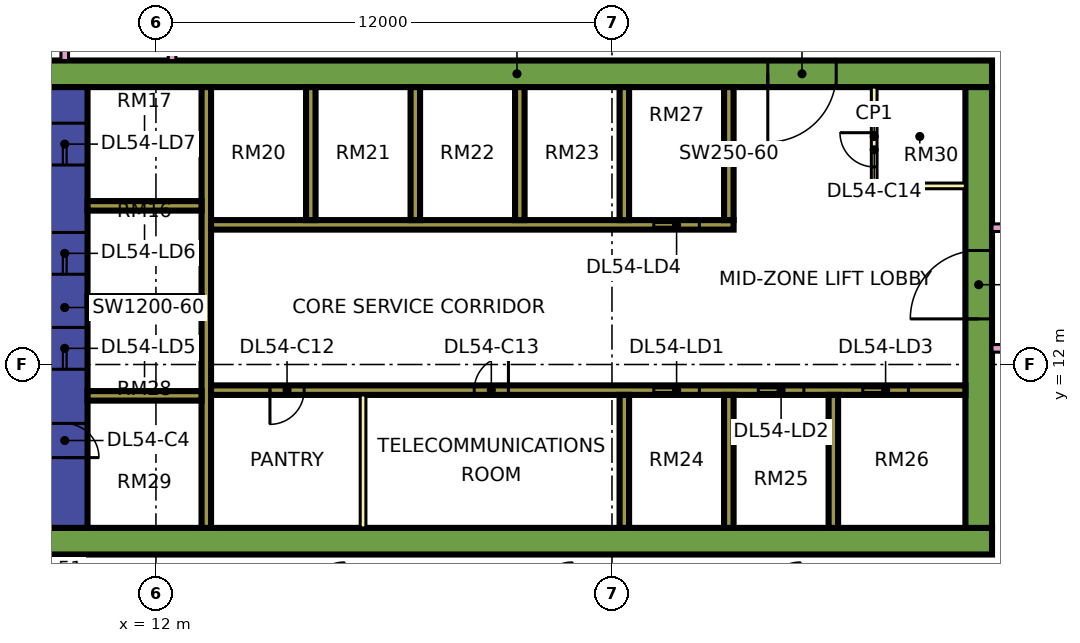
"""IFC4 building model, lengths in metres.
Left out: names, types, materials, properties, quantities, classifications, styles, units other than length and angle.
Written with IfcOpenShell. Run it as: python <this file> out.ifc"""

import sys

from ifc_helpers import new_model, si_unit, direction, frame, frame_2d, origin, place, context, subcontext, project, spatial, rectangle, extrude, element, fill, save


model = new_model("IFC4")
c1 = context("Model", 3, precision=1e-05, world=origin(), true_north=direction((0.0, 1.0)))
c2 = subcontext(c1, "Body", "Model", "MODEL_VIEW")
j1 = project(units=[si_unit("LENGTHUNIT", "METRE"), si_unit("PLANEANGLEUNIT", "RADIAN")], contexts=[c1])
p1 = place(None, origin())
s1 = spatial("IfcSite", under=j1, at=p1, CompositionType="ELEMENT")
p2 = place(p1, origin())
s2 = spatial("IfcBuilding", under=s1, at=p2, CompositionType="ELEMENT")
p3 = place(p2, frame((0.0, 0.0, 230.4)))
s3 = spatial("IfcBuildingStorey", under=s2, at=p3, CompositionType="ELEMENT", Elevation=230.4)
p4 = place(p3, frame((9.0, 7.35, 0.0), z_axis=(0.0, 0.0, 1.0), x_axis=(1.0, 0.0, 0.0)))
e1 = element("IfcWall", 1, at=p4, inside=s3, PredefinedType="SHEAR", context=c2, shape_type="SweptSolid", body=[
    extrude(rectangle(XDim=25.0, YDim=0.7, at=frame_2d((12.5, 0.0))), origin(), (0.0, 0.0, 1.0), 3.75),
])
p5 = place(p3, frame((9.0, 19.65, 0.0), z_axis=(0.0, 0.0, 1.0), x_axis=(1.0, 0.0, 0.0)))
e2 = element("IfcWall", 2, at=p5, inside=s3, PredefinedType="SHEAR", context=c2, shape_type="SweptSolid", body=[
    extrude(rectangle(XDim=25.0, YDim=0.7, at=frame_2d((12.5, 0.0))), origin(), (0.0, 0.0, 1.0), 3.75),
])
p6 = place(p5, frame((19.1, 0.0, 0.0)))
e3 = element("IfcOpeningElement", 3, at=p6, cuts=e2, PredefinedType="OPENING", context=c2, shape_type="SweptSolid", body=[
    extrude(rectangle(XDim=1.8, YDim=2.4, at=frame_2d((0.9, 1.2))), frame((0.0, 0.36, 0.0), z_axis=(0.0, -1.0, 0.0), x_axis=(1.0, 0.0, 0.0)), (0.0, 0.0, 1.0), 0.72),
])
p7 = place(p3, frame((9.6, 7.7, 0.0), z_axis=(0.0, 0.0, 1.0), x_axis=(0.0, 1.0, 0.0)))
e4 = element("IfcWall", 4, at=p7, inside=s3, PredefinedType="SHEAR", context=c2, shape_type="SweptSolid", body=[
    extrude(rectangle(XDim=11.6, YDim=1.2, at=frame_2d((5.8, 0.0))), origin(), (0.0, 0.0, 1.0), 3.75),
])
p8 = place(p7, frame((4.175, 0.0, 0.0)))
e5 = element("IfcOpeningElement", 5, at=p8, cuts=e4, PredefinedType="OPENING", context=c2, shape_type="SweptSolid", body=[
    extrude(rectangle(XDim=1.1, YDim=2.2, at=frame_2d((0.55, 1.1))), frame((0.0, 0.61, 0.0), z_axis=(0.0, -1.0, 0.0), x_axis=(1.0, 0.0, 0.0)), (0.0, 0.0, 1.0), 1.22),
])
p9 = place(p7, frame((6.675, 0.0, 0.0)))
e6 = element("IfcOpeningElement", 6, at=p9, cuts=e4, PredefinedType="OPENING", context=c2, shape_type="SweptSolid", body=[
    extrude(rectangle(XDim=1.1, YDim=2.2, at=frame_2d((0.55, 1.1))), frame((0.0, 0.61, 0.0), z_axis=(0.0, -1.0, 0.0), x_axis=(1.0, 0.0, 0.0)), (0.0, 0.0, 1.0), 1.22),
])
p10 = place(p7, frame((9.55, 0.0, 0.0)))
e7 = element("IfcOpeningElement", 7, at=p10, cuts=e4, PredefinedType="OPENING", context=c2, shape_type="SweptSolid", body=[
    extrude(rectangle(XDim=1.1, YDim=2.2, at=frame_2d((0.55, 1.1))), frame((0.0, 0.61, 0.0), z_axis=(0.0, -1.0, 0.0), x_axis=(1.0, 0.0, 0.0)), (0.0, 0.0, 1.0), 1.22),
])
p11 = place(p7, frame((1.85, 0.0, 0.0)))
e8 = element("IfcOpeningElement", 8, at=p11, cuts=e4, PredefinedType="OPENING", context=c2, shape_type="SweptSolid", body=[
    extrude(rectangle(XDim=0.9, YDim=2.1, at=frame_2d((0.45, 1.05))), frame((0.0, 0.61, 0.0), z_axis=(0.0, -1.0, 0.0), x_axis=(1.0, 0.0, 0.0)), (0.0, 0.0, 1.0), 1.22),
])
p12 = place(p3, frame((33.65, 7.7, 0.0), z_axis=(0.0, 0.0, 1.0), x_axis=(0.0, 1.0, 0.0)))
e9 = element("IfcWall", 9, at=p12, inside=s3, PredefinedType="SHEAR", context=c2, shape_type="SweptSolid", body=[
    extrude(rectangle(XDim=11.6, YDim=0.7, at=frame_2d((5.8, 0.0))), origin(), (0.0, 0.0, 1.0), 3.75),
])
p13 = place(p12, frame((5.5, 0.0, 0.0)))
e10 = element("IfcOpeningElement", 10, at=p13, cuts=e9, PredefinedType="OPENING", context=c2, shape_type="SweptSolid", body=[
    extrude(rectangle(XDim=1.8, YDim=2.4, at=frame_2d((0.9, 1.2))), frame((0.0, 0.36, 0.0), z_axis=(0.0, -1.0, 0.0), x_axis=(1.0, 0.0, 0.0)), (0.0, 0.0, 1.0), 0.72),
])
p14 = place(p3, frame((13.325, 7.7, 0.0), z_axis=(0.0, 0.0, 1.0), x_axis=(0.0, 1.0, 0.0)))
e11 = element("IfcWall", 11, at=p14, inside=s3, PredefinedType="SHEAR", context=c2, shape_type="SweptSolid", body=[
    extrude(rectangle(XDim=11.6, YDim=0.25, at=frame_2d((5.8, 0.0))), origin(), (0.0, 0.0, 1.0), 3.75),
])
p15 = place(p3, frame((13.45, 11.325, 0.0), z_axis=(0.0, 0.0, 1.0), x_axis=(1.0, 0.0, 0.0)))
e12 = element("IfcWall", 12, at=p15, inside=s3, PredefinedType="SHEAR", context=c2, shape_type="SweptSolid", body=[
    extrude(rectangle(XDim=19.85, YDim=0.25, at=frame_2d((9.925, 0.0))), origin(), (0.0, 0.0, 1.0), 3.75),
])
p16 = place(p15, frame((11.65, 0.0, 0.0)))
e13 = element("IfcOpeningElement", 13, at=p16, cuts=e12, PredefinedType="OPENING", context=c2, shape_type="SweptSolid", body=[
    extrude(rectangle(XDim=1.2, YDim=2.2, at=frame_2d((0.6, 1.1))), frame((0.0, 0.135, 0.0), z_axis=(0.0, -1.0, 0.0), x_axis=(1.0, 0.0, 0.0)), (0.0, 0.0, 1.0), 0.27),
])
p17 = place(p15, frame((14.4, 0.0, 0.0)))
e14 = element("IfcOpeningElement", 14, at=p17, cuts=e12, PredefinedType="OPENING", context=c2, shape_type="SweptSolid", body=[
    extrude(rectangle(XDim=1.2, YDim=2.2, at=frame_2d((0.6, 1.1))), frame((0.0, 0.135, 0.0), z_axis=(0.0, -1.0, 0.0), x_axis=(1.0, 0.0, 0.0)), (0.0, 0.0, 1.0), 0.27),
])
p18 = place(p15, frame((17.15, 0.0, 0.0)))
e15 = element("IfcOpeningElement", 15, at=p18, cuts=e12, PredefinedType="OPENING", context=c2, shape_type="SweptSolid", body=[
    extrude(rectangle(XDim=1.2, YDim=2.2, at=frame_2d((0.6, 1.1))), frame((0.0, 0.135, 0.0), z_axis=(0.0, -1.0, 0.0), x_axis=(1.0, 0.0, 0.0)), (0.0, 0.0, 1.0), 0.27),
])
p19 = place(p15, frame((1.55, 0.0, 0.0)))
e16 = element("IfcOpeningElement", 16, at=p19, cuts=e12, PredefinedType="OPENING", context=c2, shape_type="SweptSolid", body=[
    extrude(rectangle(XDim=0.9, YDim=2.1, at=frame_2d((0.45, 1.05))), frame((0.0, 0.135, 0.0), z_axis=(0.0, -1.0, 0.0), x_axis=(1.0, 0.0, 0.0)), (0.0, 0.0, 1.0), 0.27),
])
p20 = place(p15, frame((6.925, 0.0, 0.0)))
e17 = element("IfcOpeningElement", 17, at=p20, cuts=e12, PredefinedType="OPENING", context=c2, shape_type="SweptSolid", body=[
    extrude(rectangle(XDim=0.9, YDim=2.1, at=frame_2d((0.45, 1.05))), frame((0.0, 0.135, 0.0), z_axis=(0.0, -1.0, 0.0), x_axis=(1.0, 0.0, 0.0)), (0.0, 0.0, 1.0), 0.27),
])
p21 = place(p3, frame((13.45, 15.675, 0.0), z_axis=(0.0, 0.0, 1.0), x_axis=(1.0, 0.0, 0.0)))
e18 = element("IfcWall", 18, at=p21, inside=s3, PredefinedType="SHEAR", context=c2, shape_type="SweptSolid", body=[
    extrude(rectangle(XDim=13.75, YDim=0.25, at=frame_2d((6.875, 0.0))), origin(), (0.0, 0.0, 1.0), 3.75),
])
p22 = place(p21, frame((11.65, 0.0, 0.0)))
e19 = element("IfcOpeningElement", 19, at=p22, cuts=e18, PredefinedType="OPENING", context=c2, shape_type="SweptSolid", body=[
    extrude(rectangle(XDim=1.2, YDim=2.2, at=frame_2d((0.6, 1.1))), frame((0.0, 0.135, 0.0), z_axis=(0.0, -1.0, 0.0), x_axis=(1.0, 0.0, 0.0)), (0.0, 0.0, 1.0), 0.27),
])
for number, where, z_axis, x_axis in (
    (20, (10.2, 11.175, 0.0), (0.0, 0.0, 1.0), (1.0, 0.0, 0.0)),
    (21, (10.2, 13.675, 0.0), (0.0, 0.0, 1.0), (1.0, 0.0, 0.0)),
    (22, (10.2, 16.175, 0.0), (0.0, 0.0, 1.0), (1.0, 0.0, 0.0)),
):
    element("IfcWall", number, at=place(p3, frame(where, z_axis=z_axis, x_axis=x_axis)), inside=s3, PredefinedType="SHEAR", context=c2, shape_type="SweptSolid", body=[
        extrude(rectangle(XDim=3.0, YDim=0.25, at=frame_2d((1.5, 0.0))), origin(), (0.0, 0.0, 1.0), 3.75),
    ])
for number, where, z_axis, x_axis in (
    (23, (24.325, 7.7, 0.0), (0.0, 0.0, 1.0), (0.0, 1.0, 0.0)),
    (24, (27.075, 7.7, 0.0), (0.0, 0.0, 1.0), (0.0, 1.0, 0.0)),
    (25, (29.825, 7.7, 0.0), (0.0, 0.0, 1.0), (0.0, 1.0, 0.0)),
    (26, (16.075, 15.8, 0.0), (0.0, 0.0, 1.0), (0.0, 1.0, 0.0)),
    (27, (18.825, 15.8, 0.0), (0.0, 0.0, 1.0), (0.0, 1.0, 0.0)),
    (28, (21.575, 15.8, 0.0), (0.0, 0.0, 1.0), (0.0, 1.0, 0.0)),
    (29, (24.325, 15.8, 0.0), (0.0, 0.0, 1.0), (0.0, 1.0, 0.0)),
    (30, (27.075, 15.8, 0.0), (0.0, 0.0, 1.0), (0.0, 1.0, 0.0)),
):
    element("IfcWall", number, at=place(p3, frame(where, z_axis=z_axis, x_axis=x_axis)), inside=s3, PredefinedType="SHEAR", context=c2, shape_type="SweptSolid", body=[
        extrude(rectangle(XDim=3.5, YDim=0.25, at=frame_2d((1.75, 0.0))), origin(), (0.0, 0.0, 1.0), 3.75),
    ])
p23 = place(p3, frame((-1.447, 12.553, 0.0), z_axis=(0.0, 0.0, 1.0), x_axis=(0.707106781187, -0.707106781187, 0.0)))
e31 = element("IfcWall", 31, at=p23, inside=s3, PredefinedType="SOLIDWALL", context=c2, shape_type="SweptSolid", body=[
    extrude(rectangle(XDim=19.799, YDim=0.15, at=frame_2d((9.899, 0.0))), origin(), (0.0, 0.0, 1.0), 3.35),
])
p24 = place(p23, frame((2.212, 0.0, 0.45)))
e32 = element("IfcOpeningElement", 32, at=p24, cuts=e31, PredefinedType="OPENING", context=c2, shape_type="SweptSolid", body=[
    extrude(rectangle(XDim=3.0, YDim=2.4, at=frame_2d((1.5, 1.2))), frame((0.0, 0.085, 0.0), z_axis=(0.0, -1.0, 0.0), x_axis=(1.0, 0.0, 0.0)), (0.0, 0.0, 1.0), 0.17),
])
p25 = place(p23, frame((10.216, 0.0, 0.45)))
e33 = element("IfcOpeningElement", 33, at=p25, cuts=e31, PredefinedType="OPENING", context=c2, shape_type="SweptSolid", body=[
    extrude(rectangle(XDim=3.0, YDim=2.4, at=frame_2d((1.5, 1.2))), frame((0.0, 0.085, 0.0), z_axis=(0.0, -1.0, 0.0), x_axis=(1.0, 0.0, 0.0)), (0.0, 0.0, 1.0), 0.17),
])
p26 = place(p3, frame((17.45, 7.7, 0.0), z_axis=(0.0, 0.0, 1.0), x_axis=(0.0, 1.0, 0.0)))
e34 = element("IfcWall", 34, at=p26, inside=s3, PredefinedType="PARTITIONING", context=c2, shape_type="SweptSolid", body=[
    extrude(rectangle(XDim=3.5, YDim=0.15, at=frame_2d((1.75, 0.0))), origin(), (0.0, 0.0, 1.0), 3.35),
])
p27 = place(p3, frame((30.9, 16.7, 0.0), z_axis=(0.0, 0.0, 1.0), x_axis=(0.0, 1.0, 0.0)))
e35 = element("IfcWall", 35, at=p27, inside=s3, PredefinedType="PARTITIONING", context=c2, shape_type="SweptSolid", body=[
    extrude(rectangle(XDim=2.6, YDim=0.15, at=frame_2d((1.3, 0.0))), origin(), (0.0, 0.0, 1.0), 3.35),
])
p28 = place(p27, frame((0.5, 0.0, 0.0)))
e36 = element("IfcOpeningElement", 36, at=p28, cuts=e35, PredefinedType="OPENING", context=c2, shape_type="SweptSolid", body=[
    extrude(rectangle(XDim=0.9, YDim=2.1, at=frame_2d((0.45, 1.05))), frame((0.0, 0.085, 0.0), z_axis=(0.0, -1.0, 0.0), x_axis=(1.0, 0.0, 0.0)), (0.0, 0.0, 1.0), 0.17),
])
p29 = place(p3, frame((30.9, 16.7, 0.0), z_axis=(0.0, 0.0, 1.0), x_axis=(1.0, 0.0, 0.0)))
e37 = element("IfcWall", 37, at=p29, inside=s3, PredefinedType="PARTITIONING", context=c2, shape_type="SweptSolid", body=[
    extrude(rectangle(XDim=2.4, YDim=0.15, at=frame_2d((1.2, 0.0))), origin(), (0.0, 0.0, 1.0), 3.35),
])
p30 = place(p3, frame((9.6, 20.0, 0.0), z_axis=(0.0, 0.0, 1.0), x_axis=(0.0, 1.0, 0.0)))
e38 = element("IfcWall", 38, at=p30, inside=s3, PredefinedType="PARTITIONING", context=c2, shape_type="SweptSolid", body=[
    extrude(rectangle(XDim=44.35, YDim=0.2, at=frame_2d((22.175, 0.0))), origin(), (0.0, 0.0, 1.0), 3.35),
])
p31 = place(p30, frame((17.1, 0.0, 0.0)))
e39 = element("IfcOpeningElement", 39, at=p31, cuts=e38, PredefinedType="OPENING", context=c2, shape_type="SweptSolid", body=[
    extrude(rectangle(XDim=1.0, YDim=2.1, at=frame_2d((0.5, 1.05))), frame((0.0, 0.11, 0.0), z_axis=(0.0, -1.0, 0.0), x_axis=(1.0, 0.0, 0.0)), (0.0, 0.0, 1.0), 0.22),
])
p32 = place(p30, frame((0.6, 0.0, 0.0)))
e40 = element("IfcOpeningElement", 40, at=p32, cuts=e38, PredefinedType="OPENING", context=c2, shape_type="SweptSolid", body=[
    extrude(rectangle(XDim=1.2, YDim=2.1, at=frame_2d((0.6, 1.05))), frame((0.0, 0.11, 0.0), z_axis=(0.0, -1.0, 0.0), x_axis=(1.0, 0.0, 0.0)), (0.0, 0.0, 1.0), 0.22),
])
p33 = place(p30, frame((3.9, 0.0, 0.0)))
e41 = element("IfcOpeningElement", 41, at=p33, cuts=e38, PredefinedType="OPENING", context=c2, shape_type="SweptSolid", body=[
    extrude(rectangle(XDim=1.0, YDim=2.1, at=frame_2d((0.5, 1.05))), frame((0.0, 0.11, 0.0), z_axis=(0.0, -1.0, 0.0), x_axis=(1.0, 0.0, 0.0)), (0.0, 0.0, 1.0), 0.22),
])
p34 = place(p3, frame((12.425, 20.0, 0.0), z_axis=(0.0, 0.0, 1.0), x_axis=(0.0, 1.0, 0.0)))
e42 = element("IfcWall", 42, at=p34, inside=s3, PredefinedType="PARTITIONING", context=c2, shape_type="SweptSolid", body=[
    extrude(rectangle(XDim=42.926, YDim=0.2, at=frame_2d((21.463, 0.0))), origin(), (0.0, 0.0, 1.0), 3.35),
])
p35 = place(p34, frame((6.7, 0.0, 0.0)))
e43 = element("IfcOpeningElement", 43, at=p35, cuts=e42, PredefinedType="OPENING", context=c2, shape_type="SweptSolid", body=[
    extrude(rectangle(XDim=1.6, YDim=2.1, at=frame_2d((0.8, 1.05))), frame((0.0, 0.11, 0.0), z_axis=(0.0, -1.0, 0.0), x_axis=(1.0, 0.0, 0.0)), (0.0, 0.0, 1.0), 0.22),
])
p36 = place(p34, frame((12.95, 0.0, 0.0)))
e44 = element("IfcOpeningElement", 44, at=p36, cuts=e42, PredefinedType="OPENING", context=c2, shape_type="SweptSolid", body=[
    extrude(rectangle(XDim=1.0, YDim=2.1, at=frame_2d((0.5, 1.05))), frame((0.0, 0.11, 0.0), z_axis=(0.0, -1.0, 0.0), x_axis=(1.0, 0.0, 0.0)), (0.0, 0.0, 1.0), 0.22),
])
p37 = place(p34, frame((23.2, 0.0, 0.0)))
e45 = element("IfcOpeningElement", 45, at=p37, cuts=e42, PredefinedType="OPENING", context=c2, shape_type="SweptSolid", body=[
    extrude(rectangle(XDim=1.0, YDim=2.1, at=frame_2d((0.5, 1.05))), frame((0.0, 0.11, 0.0), z_axis=(0.0, -1.0, 0.0), x_axis=(1.0, 0.0, 0.0)), (0.0, 0.0, 1.0), 0.22),
])
p38 = place(p34, frame((35.35, 0.0, 0.0)))
e46 = element("IfcOpeningElement", 46, at=p38, cuts=e42, PredefinedType="OPENING", context=c2, shape_type="SweptSolid", body=[
    extrude(rectangle(XDim=1.0, YDim=2.1, at=frame_2d((0.5, 1.05))), frame((0.0, 0.11, 0.0), z_axis=(0.0, -1.0, 0.0), x_axis=(1.0, 0.0, 0.0)), (0.0, 0.0, 1.0), 0.22),
])
p39 = place(p34, frame((1.15, 0.0, 0.0)))
e47 = element("IfcOpeningElement", 47, at=p39, cuts=e42, PredefinedType="OPENING", context=c2, shape_type="SweptSolid", body=[
    extrude(rectangle(XDim=1.8, YDim=2.1, at=frame_2d((0.9, 1.05))), frame((0.0, 0.11, 0.0), z_axis=(0.0, -1.0, 0.0), x_axis=(1.0, 0.0, 0.0)), (0.0, 0.0, 1.0), 0.22),
])
p40 = place(p34, frame((28.6, 0.0, 0.0)))
e48 = element("IfcOpeningElement", 48, at=p40, cuts=e42, PredefinedType="OPENING", context=c2, shape_type="SweptSolid", body=[
    extrude(rectangle(XDim=1.8, YDim=2.1, at=frame_2d((0.9, 1.05))), frame((0.0, 0.11, 0.0), z_axis=(0.0, -1.0, 0.0), x_axis=(1.0, 0.0, 0.0)), (0.0, 0.0, 1.0), 0.22),
])
p41 = place(p3, frame((34.0, 12.425, 0.0), z_axis=(0.0, 0.0, 1.0), x_axis=(1.0, 0.0, 0.0)))
e49 = element("IfcWall", 49, at=p41, inside=s3, PredefinedType="PARTITIONING", context=c2, shape_type="SweptSolid", body=[
    extrude(rectangle(XDim=2.426, YDim=0.2, at=frame_2d((1.213, 0.0))), origin(), (0.0, 0.0, 1.0), 3.35),
])
p42 = place(p3, frame((34.0, 15.6, 0.0), z_axis=(0.0, 0.0, 1.0), x_axis=(1.0, 0.0, 0.0)))
e50 = element("IfcWall", 50, at=p42, inside=s3, PredefinedType="PARTITIONING", context=c2, shape_type="SweptSolid", body=[
    extrude(rectangle(XDim=10.35, YDim=0.2, at=frame_2d((5.175, 0.0))), origin(), (0.0, 0.0, 1.0), 3.35),
])
p43 = place(p42, frame((5.6, 0.0, 0.0)))
e51 = element("IfcOpeningElement", 51, at=p43, cuts=e50, PredefinedType="OPENING", context=c2, shape_type="SweptSolid", body=[
    extrude(rectangle(XDim=1.0, YDim=2.1, at=frame_2d((0.5, 1.05))), frame((0.0, 0.11, 0.0), z_axis=(0.0, -1.0, 0.0), x_axis=(1.0, 0.0, 0.0)), (0.0, 0.0, 1.0), 0.22),
])
p44 = place(p42, frame((0.45, 0.0, 0.0)))
e52 = element("IfcOpeningElement", 52, at=p44, cuts=e50, PredefinedType="OPENING", context=c2, shape_type="SweptSolid", body=[
    extrude(rectangle(XDim=1.2, YDim=2.1, at=frame_2d((0.6, 1.05))), frame((0.0, 0.11, 0.0), z_axis=(0.0, -1.0, 0.0), x_axis=(1.0, 0.0, 0.0)), (0.0, 0.0, 1.0), 0.22),
])
p45 = place(p16, origin())
e53 = element("IfcDoor", 53, at=p45, inside=s3, OperationType="DOUBLE_DOOR_SLIDING", PredefinedType="DOOR", context=c2, shape_type="SweptSolid", body=[
    extrude(rectangle(XDim=1.2, YDim=2.2, at=frame_2d((0.6, 1.1))), frame((0.0, 0.025, 0.0), z_axis=(0.0, -1.0, 0.0), x_axis=(1.0, 0.0, 0.0)), (0.0, 0.0, 1.0), 0.05),
])
fill(e13, e53)
p46 = place(p17, origin())
e54 = element("IfcDoor", 54, at=p46, inside=s3, OperationType="DOUBLE_DOOR_SLIDING", PredefinedType="DOOR", context=c2, shape_type="SweptSolid", body=[
    extrude(rectangle(XDim=1.2, YDim=2.2, at=frame_2d((0.6, 1.1))), frame((0.0, 0.025, 0.0), z_axis=(0.0, -1.0, 0.0), x_axis=(1.0, 0.0, 0.0)), (0.0, 0.0, 1.0), 0.05),
])
fill(e14, e54)
p47 = place(p18, origin())
e55 = element("IfcDoor", 55, at=p47, inside=s3, OperationType="DOUBLE_DOOR_SLIDING", PredefinedType="DOOR", context=c2, shape_type="SweptSolid", body=[
    extrude(rectangle(XDim=1.2, YDim=2.2, at=frame_2d((0.6, 1.1))), frame((0.0, 0.025, 0.0), z_axis=(0.0, -1.0, 0.0), x_axis=(1.0, 0.0, 0.0)), (0.0, 0.0, 1.0), 0.05),
])
fill(e15, e55)
p48 = place(p22, origin())
e56 = element("IfcDoor", 56, at=p48, inside=s3, OperationType="DOUBLE_DOOR_SLIDING", PredefinedType="DOOR", context=c2, shape_type="SweptSolid", body=[
    extrude(rectangle(XDim=1.2, YDim=2.2, at=frame_2d((0.6, 1.1))), frame((0.0, 0.025, 0.0), z_axis=(0.0, -1.0, 0.0), x_axis=(1.0, 0.0, 0.0)), (0.0, 0.0, 1.0), 0.05),
])
fill(e19, e56)
p49 = place(p8, origin())
e57 = element("IfcDoor", 57, at=p49, inside=s3, OperationType="DOUBLE_DOOR_SLIDING", PredefinedType="DOOR", context=c2, shape_type="SweptSolid", body=[
    extrude(rectangle(XDim=1.1, YDim=2.2, at=frame_2d((0.55, 1.1))), frame((0.0, 0.025, 0.0), z_axis=(0.0, -1.0, 0.0), x_axis=(1.0, 0.0, 0.0)), (0.0, 0.0, 1.0), 0.05),
])
fill(e5, e57)
p50 = place(p9, origin())
e58 = element("IfcDoor", 58, at=p50, inside=s3, OperationType="DOUBLE_DOOR_SLIDING", PredefinedType="DOOR", context=c2, shape_type="SweptSolid", body=[
    extrude(rectangle(XDim=1.1, YDim=2.2, at=frame_2d((0.55, 1.1))), frame((0.0, 0.025, 0.0), z_axis=(0.0, -1.0, 0.0), x_axis=(1.0, 0.0, 0.0)), (0.0, 0.0, 1.0), 0.05),
])
fill(e6, e58)
p51 = place(p10, origin())
e59 = element("IfcDoor", 59, at=p51, inside=s3, OperationType="DOUBLE_DOOR_SLIDING", PredefinedType="DOOR", context=c2, shape_type="SweptSolid", body=[
    extrude(rectangle(XDim=1.1, YDim=2.2, at=frame_2d((0.55, 1.1))), frame((0.0, 0.025, 0.0), z_axis=(0.0, -1.0, 0.0), x_axis=(1.0, 0.0, 0.0)), (0.0, 0.0, 1.0), 0.05),
])
fill(e7, e59)
p52 = place(p13, origin())
e60 = element("IfcDoor", 60, at=p52, inside=s3, OperationType="DOUBLE_DOOR_SINGLE_SWING", PredefinedType="DOOR", context=c2, shape_type="SweptSolid", body=[
    extrude(rectangle(XDim=1.8, YDim=2.4, at=frame_2d((0.9, 1.2))), frame((0.0, 0.025, 0.0), z_axis=(0.0, -1.0, 0.0), x_axis=(1.0, 0.0, 0.0)), (0.0, 0.0, 1.0), 0.05),
])
fill(e10, e60)
p53 = place(p6, frame((1.8, 0.0, 0.0), z_axis=(0.0, 0.0, 1.0), x_axis=(-1.0, 0.0, 0.0)))
e61 = element("IfcDoor", 61, at=p53, inside=s3, OperationType="DOUBLE_DOOR_SINGLE_SWING", PredefinedType="DOOR", context=c2, shape_type="SweptSolid", body=[
    extrude(rectangle(XDim=1.8, YDim=2.4, at=frame_2d((0.9, 1.2))), frame((0.0, 0.025, 0.0), z_axis=(0.0, -1.0, 0.0), x_axis=(1.0, 0.0, 0.0)), (0.0, 0.0, 1.0), 0.05),
])
fill(e3, e61)
p54 = place(p11, frame((0.9, 0.0, 0.0), z_axis=(0.0, 0.0, 1.0), x_axis=(-1.0, 0.0, 0.0)))
e62 = element("IfcDoor", 62, at=p54, inside=s3, OperationType="SINGLE_SWING_LEFT", PredefinedType="DOOR", context=c2, shape_type="SweptSolid", body=[
    extrude(rectangle(XDim=0.9, YDim=2.1, at=frame_2d((0.45, 1.05))), frame((0.0, 0.025, 0.0), z_axis=(0.0, -1.0, 0.0), x_axis=(1.0, 0.0, 0.0)), (0.0, 0.0, 1.0), 0.05),
])
fill(e8, e62)
p55 = place(p19, frame((0.9, 0.0, 0.0), z_axis=(0.0, 0.0, 1.0), x_axis=(-1.0, 0.0, 0.0)))
e63 = element("IfcDoor", 63, at=p55, inside=s3, OperationType="SINGLE_SWING_LEFT", PredefinedType="DOOR", context=c2, shape_type="SweptSolid", body=[
    extrude(rectangle(XDim=0.9, YDim=2.1, at=frame_2d((0.45, 1.05))), frame((0.0, 0.025, 0.0), z_axis=(0.0, -1.0, 0.0), x_axis=(1.0, 0.0, 0.0)), (0.0, 0.0, 1.0), 0.05),
])
fill(e16, e63)
p56 = place(p20, frame((0.9, 0.0, 0.0), z_axis=(0.0, 0.0, 1.0), x_axis=(-1.0, 0.0, 0.0)))
e64 = element("IfcDoor", 64, at=p56, inside=s3, OperationType="SINGLE_SWING_RIGHT", PredefinedType="DOOR", context=c2, shape_type="SweptSolid", body=[
    extrude(rectangle(XDim=0.9, YDim=2.1, at=frame_2d((0.45, 1.05))), frame((0.0, 0.025, 0.0), z_axis=(0.0, -1.0, 0.0), x_axis=(1.0, 0.0, 0.0)), (0.0, 0.0, 1.0), 0.05),
])
fill(e17, e64)
p57 = place(p28, frame((0.9, 0.0, 0.0), z_axis=(0.0, 0.0, 1.0), x_axis=(-1.0, 0.0, 0.0)))
e65 = element("IfcDoor", 65, at=p57, inside=s3, OperationType="SINGLE_SWING_RIGHT", PredefinedType="DOOR", context=c2, shape_type="SweptSolid", body=[
    extrude(rectangle(XDim=0.9, YDim=2.1, at=frame_2d((0.45, 1.05))), frame((0.0, 0.025, 0.0), z_axis=(0.0, -1.0, 0.0), x_axis=(1.0, 0.0, 0.0)), (0.0, 0.0, 1.0), 0.05),
])
fill(e36, e65)
save(model, sys.argv[1])
